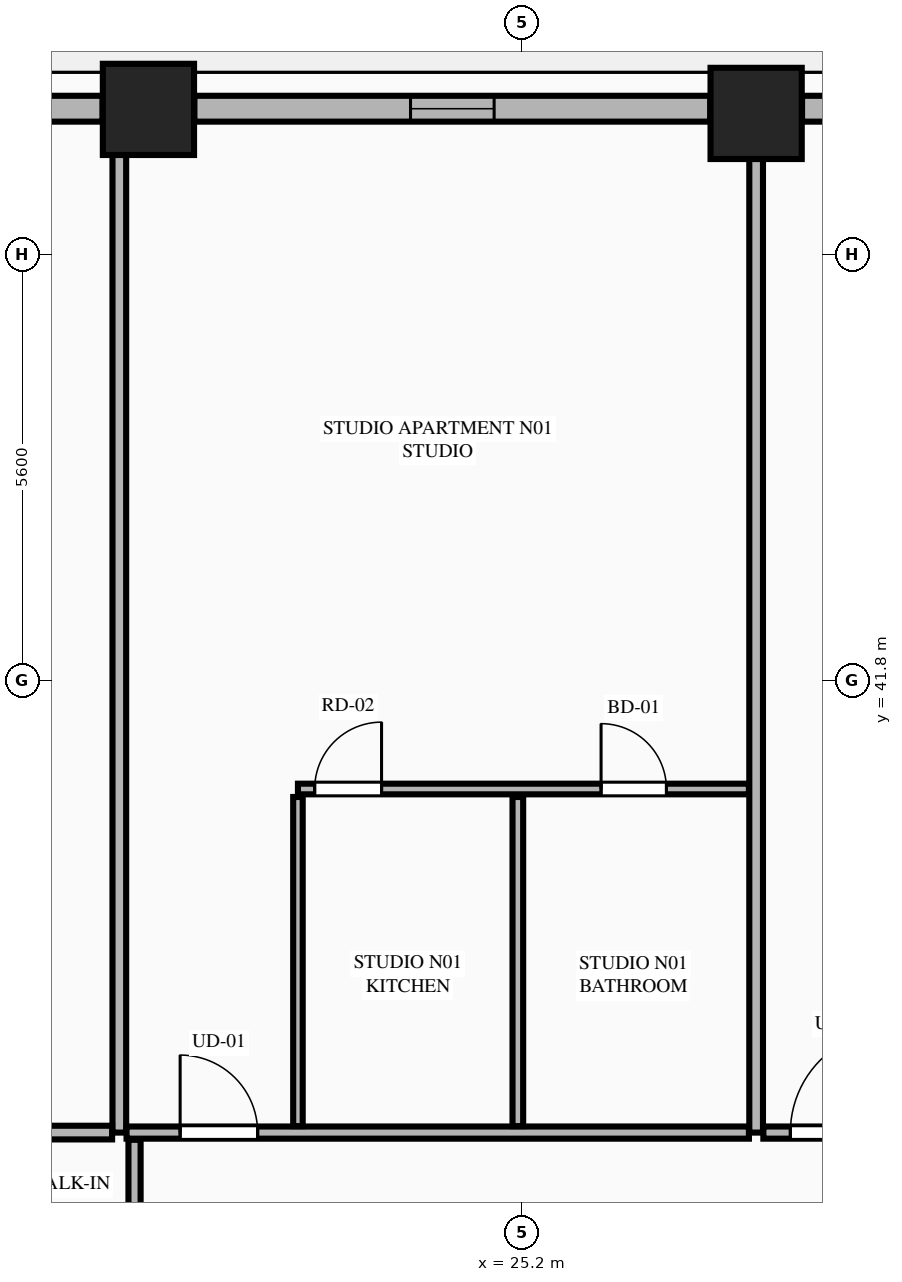
"""IFC4 building model, lengths in metres.
Left out: names, types, materials, properties, quantities, classifications, styles, units other than length and angle.
Written with IfcOpenShell. Run it as: python <this file> out.ifc"""

import sys

from ifc_helpers import new_model, si_unit, direction, frame, frame_2d, origin, origin_2d, place, context, subcontext, project, spatial, rectangle, extrude, element, fill, save


model = new_model("IFC4")
c1 = context("Model", 3, precision=1e-05, world=origin(), true_north=direction((0.0, 1.0)))
c2 = subcontext(c1, "Body", "Model", "MODEL_VIEW")
j1 = project(units=[si_unit("LENGTHUNIT", "METRE"), si_unit("PLANEANGLEUNIT", "RADIAN")], contexts=[c1])
p1 = place(None, origin())
s1 = spatial("IfcSite", under=j1, at=p1, CompositionType="ELEMENT")
p2 = place(p1, origin())
s2 = spatial("IfcBuilding", under=s1, at=p2, CompositionType="ELEMENT")
p3 = place(p2, frame((0.0, 0.0, 46.2)))
s3 = spatial("IfcBuildingStorey", under=s2, at=p3, CompositionType="ELEMENT", Elevation=46.2)
for number, where, z_axis, x_axis in (
    (1, (28.278, 49.258, 0.0), (0.0, 0.0, 1.0), (1.0, 0.0, 0.0)),
    (2, (20.283, 49.311, 0.0), (0.0, 0.0, 1.0), (1.0, 0.0, 0.0)),
):
    element("IfcColumn", number, at=place(p3, frame(where, z_axis=z_axis, x_axis=x_axis)), inside=s3, PredefinedType="COLUMN", context=c2, shape_type="SweptSolid", body=[
        extrude(rectangle(XDim=1.2, YDim=1.2, at=origin_2d()), origin(), (0.0, 0.0, 1.0), 3.55),
    ])
p4 = place(p3, frame((35.918, 49.32, 0.0), z_axis=(0.0, 0.0, 1.0), x_axis=(-1.0, 0.0, 0.0)))
e3 = element("IfcWall", 3, at=p4, inside=s3, PredefinedType="STANDARD", context=c2, shape_type="SweptSolid", body=[
    extrude(rectangle(XDim=7.036, YDim=0.34, at=frame_2d((3.518, 0.0))), origin(), (0.0, 0.0, 1.0), 2.787),
])
p5 = place(p4, frame((3.539, 0.0, 0.0)))
e4 = element("IfcOpeningElement", 4, at=p5, cuts=e3, PredefinedType="OPENING", context=c2, shape_type="SweptSolid", body=[
    extrude(rectangle(XDim=1.1, YDim=2.25, at=frame_2d((0.55, 1.125))), frame((0.0, 0.18, 0.0), z_axis=(0.0, -1.0, 0.0), x_axis=(1.0, 0.0, 0.0)), (0.0, 0.0, 1.0), 0.36),
])
p6 = place(p3, frame((27.674, 49.32, 0.0), z_axis=(0.0, 0.0, 1.0), x_axis=(-1.0, 0.0, 0.0)))
e5 = element("IfcWall", 5, at=p6, inside=s3, PredefinedType="STANDARD", context=c2, shape_type="SweptSolid", body=[
    extrude(rectangle(XDim=6.787, YDim=0.34, at=frame_2d((3.394, 0.0))), origin(), (0.0, 0.0, 1.0), 2.787),
])
p7 = place(p6, frame((2.843, 0.0, 0.75)))
e6 = element("IfcOpeningElement", 6, at=p7, cuts=e5, PredefinedType="OPENING", context=c2, shape_type="SweptSolid", body=[
    extrude(rectangle(XDim=1.1, YDim=1.887, at=frame_2d((0.55, 0.943))), frame((0.0, 0.18, 0.0), z_axis=(0.0, -1.0, 0.0), x_axis=(1.0, 0.0, 0.0)), (0.0, 0.0, 1.0), 0.36),
])
p8 = place(p3, frame((19.679, 49.32, 0.0), z_axis=(0.0, 0.0, 1.0), x_axis=(-1.0, 0.0, 0.0)))
e7 = element("IfcWall", 7, at=p8, inside=s3, PredefinedType="STANDARD", context=c2, shape_type="SweptSolid", body=[
    extrude(rectangle(XDim=1.245, YDim=0.34, at=frame_2d((0.623, 0.0))), origin(), (0.0, 0.0, 1.0), 3.33),
])
p9 = place(p3, frame((19.9, 35.85, 0.0), z_axis=(0.0, 0.0, 1.0), x_axis=(0.0, 1.0, 0.0)))
e8 = element("IfcWall", 8, at=p9, inside=s3, PredefinedType="PARTITIONING", context=c2, shape_type="SweptSolid", body=[
    extrude(rectangle(XDim=13.295, YDim=0.18, at=frame_2d((6.647, 0.0))), origin(), (0.0, 0.0, 1.0), 3.33),
])
p10 = place(p3, frame((28.278, 35.85, 0.0), z_axis=(0.0, 0.0, 1.0), x_axis=(0.0, 1.0, 0.0)))
e9 = element("IfcWall", 9, at=p10, inside=s3, PredefinedType="PARTITIONING", context=c2, shape_type="SweptSolid", body=[
    extrude(rectangle(XDim=13.295, YDim=0.18, at=frame_2d((6.647, 0.0))), origin(), (0.0, 0.0, 1.0), 2.637),
])
p11 = place(p3, frame((19.995, 35.85, 0.0), z_axis=(0.0, 0.0, 1.0), x_axis=(1.0, 0.0, 0.0)))
e10 = element("IfcWall", 10, at=p11, inside=s3, PredefinedType="PARTITIONING", context=c2, shape_type="SweptSolid", body=[
    extrude(rectangle(XDim=8.188, YDim=0.16, at=frame_2d((4.094, 0.0))), origin(), (0.0, 0.0, 1.0), 3.33),
])
p12 = place(p11, frame((0.705, 0.0, 0.0)))
e11 = element("IfcOpeningElement", 11, at=p12, cuts=e10, PredefinedType="OPENING", context=c2, shape_type="SweptSolid", body=[
    extrude(rectangle(XDim=1.02, YDim=2.25, at=frame_2d((0.51, 1.125))), frame((0.0, 0.09, 0.0), z_axis=(0.0, -1.0, 0.0), x_axis=(1.0, 0.0, 0.0)), (0.0, 0.0, 1.0), 0.18),
])
p13 = place(p3, frame((22.25, 35.935, 0.0), z_axis=(0.0, 0.0, 1.0), x_axis=(0.0, 1.0, 0.0)))
e12 = element("IfcWall", 12, at=p13, inside=s3, PredefinedType="PARTITIONING", context=c2, shape_type="SweptSolid", body=[
    extrude(rectangle(XDim=4.33, YDim=0.125, at=frame_2d((2.165, 0.0))), origin(), (0.0, 0.0, 1.0), 2.637),
])
p14 = place(p3, frame((22.25, 40.37, 0.0), z_axis=(0.0, 0.0, 1.0), x_axis=(1.0, 0.0, 0.0)))
e13 = element("IfcWall", 13, at=p14, inside=s3, PredefinedType="PLUMBINGWALL", context=c2, shape_type="SweptSolid", body=[
    extrude(rectangle(XDim=5.933, YDim=0.14, at=frame_2d((2.967, 0.0))), origin(), (0.0, 0.0, 1.0), 3.33),
])
p15 = place(p14, frame((3.988, 0.0, 0.0)))
e14 = element("IfcOpeningElement", 14, at=p15, cuts=e13, PredefinedType="OPENING", context=c2, shape_type="SweptSolid", body=[
    extrude(rectangle(XDim=0.86, YDim=2.1, at=frame_2d((0.43, 1.05))), frame((0.0, 0.08, 0.0), z_axis=(0.0, -1.0, 0.0), x_axis=(1.0, 0.0, 0.0)), (0.0, 0.0, 1.0), 0.16),
])
p16 = place(p14, frame((0.22, 0.0, 0.0)))
e15 = element("IfcOpeningElement", 15, at=p16, cuts=e13, PredefinedType="OPENING", context=c2, shape_type="SweptSolid", body=[
    extrude(rectangle(XDim=0.88, YDim=2.15, at=frame_2d((0.44, 1.075))), frame((0.0, 0.08, 0.0), z_axis=(0.0, -1.0, 0.0), x_axis=(1.0, 0.0, 0.0)), (0.0, 0.0, 1.0), 0.16),
])
p17 = place(p3, frame((25.143, 35.935, 0.0), z_axis=(0.0, 0.0, 1.0), x_axis=(0.0, 1.0, 0.0)))
e16 = element("IfcWall", 16, at=p17, inside=s3, PredefinedType="PLUMBINGWALL", context=c2, shape_type="SweptSolid", body=[
    extrude(rectangle(XDim=4.33, YDim=0.14, at=frame_2d((2.165, 0.0))), origin(), (0.0, 0.0, 1.0), 3.33),
])
p18 = place(p3, frame((28.373, 35.85, 0.0), z_axis=(0.0, 0.0, 1.0), x_axis=(1.0, 0.0, 0.0)))
e17 = element("IfcWall", 17, at=p18, inside=s3, PredefinedType="PARTITIONING", context=c2, shape_type="SweptSolid", body=[
    extrude(rectangle(XDim=16.432, YDim=0.16, at=frame_2d((8.216, 0.0))), origin(), (0.0, 0.0, 1.0), 3.33),
])
p19 = place(p18, frame((0.355, 0.0, 0.0)))
e18 = element("IfcOpeningElement", 18, at=p19, cuts=e17, PredefinedType="OPENING", context=c2, shape_type="SweptSolid", body=[
    extrude(rectangle(XDim=1.35, YDim=2.35, at=frame_2d((0.675, 1.175))), frame((0.0, 0.09, 0.0), z_axis=(0.0, -1.0, 0.0), x_axis=(1.0, 0.0, 0.0)), (0.0, 0.0, 1.0), 0.18),
])
p20 = place(p3, frame((10.665, 35.85, 0.0), z_axis=(0.0, 0.0, 1.0), x_axis=(1.0, 0.0, 0.0)))
e19 = element("IfcWall", 19, at=p20, inside=s3, PredefinedType="PARTITIONING", context=c2, shape_type="SweptSolid", body=[
    extrude(rectangle(XDim=9.14, YDim=0.18, at=frame_2d((4.57, 0.0))), origin(), (0.0, 0.0, 1.0), 3.33),
])
p21 = place(p3, frame((20.1, 16.045, 0.0), z_axis=(0.0, 0.0, 1.0), x_axis=(0.0, 1.0, 0.0)))
e20 = element("IfcWall", 20, at=p21, inside=s3, PredefinedType="PARTITIONING", context=c2, shape_type="SweptSolid", body=[
    extrude(rectangle(XDim=19.71, YDim=0.16, at=frame_2d((9.855, 0.0))), origin(), (0.0, 0.0, 1.0), 3.33),
])
p22 = place(p21, frame((0.45, 0.0, 0.0)))
e21 = element("IfcOpeningElement", 21, at=p22, cuts=e20, PredefinedType="OPENING", context=c2, shape_type="SweptSolid", body=[
    extrude(rectangle(XDim=1.02, YDim=2.25, at=frame_2d((0.51, 1.125))), frame((0.0, 0.09, 0.0), z_axis=(0.0, -1.0, 0.0), x_axis=(1.0, 0.0, 0.0)), (0.0, 0.0, 1.0), 0.18),
])
p23 = place(p7, origin())
e22 = element("IfcWindow", 22, at=p23, inside=s3, PartitioningType="SINGLE_PANEL", PredefinedType="WINDOW", context=c2, shape_type="SweptSolid", body=[
    extrude(rectangle(XDim=1.1, YDim=1.887, at=frame_2d((0.55, 0.943))), frame((0.0, 0.03, 0.0), z_axis=(0.0, -1.0, 0.0), x_axis=(1.0, 0.0, 0.0)), (0.0, 0.0, 1.0), 0.06),
])
fill(e6, e22)
p24 = place(p15, origin())
e23 = element("IfcDoor", 23, at=p24, inside=s3, OperationType="SINGLE_SWING_LEFT", PredefinedType="DOOR", context=c2, shape_type="SweptSolid", body=[
    extrude(rectangle(XDim=0.86, YDim=2.1, at=frame_2d((0.43, 1.05))), frame((0.0, 0.025, 0.0), z_axis=(0.0, -1.0, 0.0), x_axis=(1.0, 0.0, 0.0)), (0.0, 0.0, 1.0), 0.05),
])
fill(e14, e23)
p25 = place(p12, origin())
e24 = element("IfcDoor", 24, at=p25, inside=s3, OperationType="SINGLE_SWING_LEFT", PredefinedType="DOOR", context=c2, shape_type="SweptSolid", body=[
    extrude(rectangle(XDim=1.02, YDim=2.25, at=frame_2d((0.51, 1.125))), frame((0.0, 0.025, 0.0), z_axis=(0.0, -1.0, 0.0), x_axis=(1.0, 0.0, 0.0)), (0.0, 0.0, 1.0), 0.05),
])
fill(e11, e24)
p26 = place(p16, origin())
e25 = element("IfcDoor", 25, at=p26, inside=s3, OperationType="SINGLE_SWING_RIGHT", PredefinedType="DOOR", context=c2, shape_type="SweptSolid", body=[
    extrude(rectangle(XDim=0.88, YDim=2.15, at=frame_2d((0.44, 1.075))), frame((0.0, 0.025, 0.0), z_axis=(0.0, -1.0, 0.0), x_axis=(1.0, 0.0, 0.0)), (0.0, 0.0, 1.0), 0.05),
])
fill(e15, e25)
p27 = place(p19, origin())
e26 = element("IfcDoor", 26, at=p27, inside=s3, OperationType="SINGLE_SWING_RIGHT", PredefinedType="DOOR", context=c2, shape_type="SweptSolid", body=[
    extrude(rectangle(XDim=1.35, YDim=2.35, at=frame_2d((0.675, 1.175))), frame((0.0, 0.025, 0.0), z_axis=(0.0, -1.0, 0.0), x_axis=(1.0, 0.0, 0.0)), (0.0, 0.0, 1.0), 0.05),
])
fill(e18, e26)
save(model, sys.argv[1])
